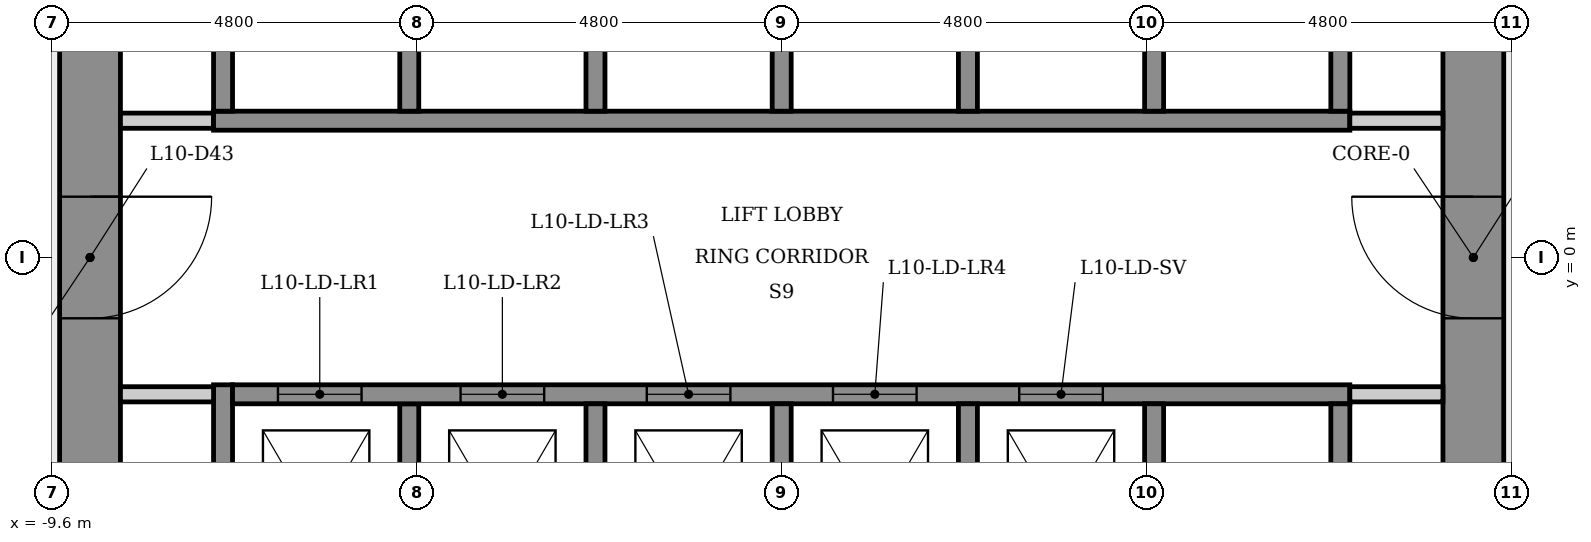
"""IFC4 building model, lengths in metres.
Left out: names, types, materials, properties, quantities, classifications, styles, units other than length and angle.
Written with IfcOpenShell. Run it as: python <this file> out.ifc"""

import sys

from ifc_helpers import new_model, si_unit, direction, frame, frame_2d, origin, place, context, subcontext, project, spatial, rectangle, extrude, element, fill, save


model = new_model("IFC4")
c1 = context("Model", 3, precision=1e-05, world=origin(), true_north=direction((0.0, 1.0)))
c2 = subcontext(c1, "Body", "Model", "MODEL_VIEW")
j1 = project(units=[si_unit("LENGTHUNIT", "METRE"), si_unit("PLANEANGLEUNIT", "RADIAN")], contexts=[c1])
p1 = place(None, origin())
s1 = spatial("IfcSite", under=j1, at=p1, CompositionType="ELEMENT")
p2 = place(p1, origin())
s2 = spatial("IfcBuilding", under=s1, at=p2, CompositionType="ELEMENT")
p3 = place(p2, frame((0.0, 0.0, 42.5)))
s3 = spatial("IfcBuildingStorey", under=s2, at=p3, CompositionType="ELEMENT", Elevation=42.5)
p4 = place(p3, frame((9.1, -5.485, 0.0), z_axis=(0.0, 0.0, 1.0), x_axis=(0.0, 1.0, 0.0)))
e1 = element("IfcWall", 1, at=p4, inside=s3, PredefinedType="SHEAR", context=c2, shape_type="SweptSolid", body=[
    extrude(rectangle(XDim=10.97, YDim=0.8, at=frame_2d((5.485, 0.0))), origin(), (0.0, 0.0, 1.0), 3.4),
])
p5 = place(p4, frame((4.685, 0.0, 0.0)))
e2 = element("IfcOpeningElement", 2, at=p5, cuts=e1, PredefinedType="OPENING", context=c2, shape_type="SweptSolid", body=[
    extrude(rectangle(XDim=1.6, YDim=2.1, at=frame_2d((0.8, 1.05))), frame((0.0, 0.41, 0.0), z_axis=(0.0, -1.0, 0.0), x_axis=(1.0, 0.0, 0.0)), (0.0, 0.0, 1.0), 0.82),
])
p6 = place(p3, frame((-9.1, 5.485, 0.0), z_axis=(0.0, 0.0, 1.0), x_axis=(0.0, -1.0, 0.0)))
e3 = element("IfcWall", 3, at=p6, inside=s3, PredefinedType="SHEAR", context=c2, shape_type="SweptSolid", body=[
    extrude(rectangle(XDim=10.97, YDim=0.8, at=frame_2d((5.485, 0.0))), origin(), (0.0, 0.0, 1.0), 3.4),
])
p7 = place(p6, frame((4.685, 0.0, 0.0)))
e4 = element("IfcOpeningElement", 4, at=p7, cuts=e3, PredefinedType="OPENING", context=c2, shape_type="SweptSolid", body=[
    extrude(rectangle(XDim=1.6, YDim=2.1, at=frame_2d((0.8, 1.05))), frame((0.0, 0.41, 0.0), z_axis=(0.0, -1.0, 0.0), x_axis=(1.0, 0.0, 0.0)), (0.0, 0.0, 1.0), 0.82),
])
p8 = place(p3, frame((-8.7, 1.8, 0.0), z_axis=(0.0, 0.0, 1.0), x_axis=(1.0, 0.0, 0.0)))
e5 = element("IfcWall", 5, at=p8, inside=s3, PredefinedType="PARTITIONING", context=c2, shape_type="SweptSolid", body=[
    extrude(rectangle(XDim=1.225, YDim=0.2, at=frame_2d((0.613, 0.0))), origin(), (0.0, 0.0, 1.0), 3.05),
])
p9 = place(p3, frame((-7.475, 1.8, 0.0), z_axis=(0.0, 0.0, 1.0), x_axis=(1.0, 0.0, 0.0)))
e6 = element("IfcWall", 6, at=p9, inside=s3, PredefinedType="SHEAR", context=c2, shape_type="SweptSolid", body=[
    extrude(rectangle(XDim=14.95, YDim=0.25, at=frame_2d((7.475, 0.0))), origin(), (0.0, 0.0, 1.0), 3.05),
])
p10 = place(p3, frame((-7.35, -5.73, 0.0), z_axis=(0.0, 0.0, 1.0), x_axis=(0.0, 1.0, 0.0)))
e7 = element("IfcWall", 7, at=p10, inside=s3, PredefinedType="SHEAR", context=c2, shape_type="SweptSolid", body=[
    extrude(rectangle(XDim=4.055, YDim=0.25, at=frame_2d((2.028, 0.0))), origin(), (0.0, 0.0, 1.0), 3.05),
])
p11 = place(p3, frame((-7.35, 1.925, 0.0), z_axis=(0.0, 0.0, 1.0), x_axis=(0.0, 1.0, 0.0)))
e8 = element("IfcWall", 8, at=p11, inside=s3, PredefinedType="SHEAR", context=c2, shape_type="SweptSolid", body=[
    extrude(rectangle(XDim=3.805, YDim=0.25, at=frame_2d((1.903, 0.0))), origin(), (0.0, 0.0, 1.0), 3.05),
])
p12 = place(p3, frame((-7.475, -1.8, 0.0), z_axis=(0.0, 0.0, 1.0), x_axis=(-1.0, 0.0, 0.0)))
e9 = element("IfcWall", 9, at=p12, inside=s3, PredefinedType="PARTITIONING", context=c2, shape_type="SweptSolid", body=[
    extrude(rectangle(XDim=1.225, YDim=0.2, at=frame_2d((0.613, 0.0))), origin(), (0.0, 0.0, 1.0), 3.05),
])
for number, where, z_axis, x_axis in (
    (10, (-4.9, -1.925, 0.0), (0.0, 0.0, 1.0), (0.0, -1.0, 0.0)),
    (11, (-4.9, 5.025, 0.0), (0.0, 0.0, 1.0), (0.0, -1.0, 0.0)),
):
    element("IfcWall", number, at=place(p3, frame(where, z_axis=z_axis, x_axis=x_axis)), inside=s3, PredefinedType="SHEAR", context=c2, shape_type="SweptSolid", body=[
        extrude(rectangle(XDim=3.1, YDim=0.25, at=frame_2d((1.55, 0.0))), origin(), (0.0, 0.0, 1.0), 3.4),
    ])
p13 = place(p3, frame((-7.225, -1.8, 0.0), z_axis=(0.0, 0.0, 1.0), x_axis=(1.0, 0.0, 0.0)))
e12 = element("IfcWall", 12, at=p13, inside=s3, PredefinedType="SHEAR", context=c2, shape_type="SweptSolid", body=[
    extrude(rectangle(XDim=14.7, YDim=0.25, at=frame_2d((7.35, 0.0))), origin(), (0.0, 0.0, 1.0), 3.05),
])
p14 = place(p13, frame((0.597, 0.0, 0.0)))
e13 = element("IfcOpeningElement", 13, at=p14, cuts=e12, PredefinedType="OPENING", context=c2, shape_type="SweptSolid", body=[
    extrude(rectangle(XDim=1.1, YDim=2.1, at=frame_2d((0.55, 1.05))), frame((0.0, 0.135, 0.0), z_axis=(0.0, -1.0, 0.0), x_axis=(1.0, 0.0, 0.0)), (0.0, 0.0, 1.0), 0.27),
])
p15 = place(p13, frame((3.0, 0.0, 0.0)))
e14 = element("IfcOpeningElement", 14, at=p15, cuts=e12, PredefinedType="OPENING", context=c2, shape_type="SweptSolid", body=[
    extrude(rectangle(XDim=1.1, YDim=2.1, at=frame_2d((0.55, 1.05))), frame((0.0, 0.135, 0.0), z_axis=(0.0, -1.0, 0.0), x_axis=(1.0, 0.0, 0.0)), (0.0, 0.0, 1.0), 0.27),
])
p16 = place(p13, frame((5.45, 0.0, 0.0)))
e15 = element("IfcOpeningElement", 15, at=p16, cuts=e12, PredefinedType="OPENING", context=c2, shape_type="SweptSolid", body=[
    extrude(rectangle(XDim=1.1, YDim=2.1, at=frame_2d((0.55, 1.05))), frame((0.0, 0.135, 0.0), z_axis=(0.0, -1.0, 0.0), x_axis=(1.0, 0.0, 0.0)), (0.0, 0.0, 1.0), 0.27),
])
p17 = place(p13, frame((7.9, 0.0, 0.0)))
e16 = element("IfcOpeningElement", 16, at=p17, cuts=e12, PredefinedType="OPENING", context=c2, shape_type="SweptSolid", body=[
    extrude(rectangle(XDim=1.1, YDim=2.1, at=frame_2d((0.55, 1.05))), frame((0.0, 0.135, 0.0), z_axis=(0.0, -1.0, 0.0), x_axis=(1.0, 0.0, 0.0)), (0.0, 0.0, 1.0), 0.27),
])
p18 = place(p13, frame((10.35, 0.0, 0.0)))
e17 = element("IfcOpeningElement", 17, at=p18, cuts=e12, PredefinedType="OPENING", context=c2, shape_type="SweptSolid", body=[
    extrude(rectangle(XDim=1.1, YDim=2.1, at=frame_2d((0.55, 1.05))), frame((0.0, 0.135, 0.0), z_axis=(0.0, -1.0, 0.0), x_axis=(1.0, 0.0, 0.0)), (0.0, 0.0, 1.0), 0.27),
])
for number, where, z_axis, x_axis in (
    (18, (-2.45, -1.925, 0.0), (0.0, 0.0, 1.0), (0.0, -1.0, 0.0)),
    (19, (-2.45, 5.025, 0.0), (0.0, 0.0, 1.0), (0.0, -1.0, 0.0)),
    (20, (0.0, -1.925, 0.0), (0.0, 0.0, 1.0), (0.0, -1.0, 0.0)),
    (21, (0.0, 5.025, 0.0), (0.0, 0.0, 1.0), (0.0, -1.0, 0.0)),
    (22, (2.45, -1.925, 0.0), (0.0, 0.0, 1.0), (0.0, -1.0, 0.0)),
    (23, (2.45, 5.025, 0.0), (0.0, 0.0, 1.0), (0.0, -1.0, 0.0)),
    (24, (4.9, -1.925, 0.0), (0.0, 0.0, 1.0), (0.0, -1.0, 0.0)),
    (25, (4.9, 5.025, 0.0), (0.0, 0.0, 1.0), (0.0, -1.0, 0.0)),
):
    element("IfcWall", number, at=place(p3, frame(where, z_axis=z_axis, x_axis=x_axis)), inside=s3, PredefinedType="SHEAR", context=c2, shape_type="SweptSolid", body=[
        extrude(rectangle(XDim=3.1, YDim=0.25, at=frame_2d((1.55, 0.0))), origin(), (0.0, 0.0, 1.0), 3.4),
    ])
p19 = place(p3, frame((7.475, 1.8, 0.0), z_axis=(0.0, 0.0, 1.0), x_axis=(1.0, 0.0, 0.0)))
e26 = element("IfcWall", 26, at=p19, inside=s3, PredefinedType="PARTITIONING", context=c2, shape_type="SweptSolid", body=[
    extrude(rectangle(XDim=1.225, YDim=0.2, at=frame_2d((0.613, 0.0))), origin(), (0.0, 0.0, 1.0), 3.05),
])
for number, where, z_axis, x_axis in (
    (27, (7.35, -1.925, 0.0), (0.0, 0.0, 1.0), (0.0, -1.0, 0.0)),
    (28, (7.35, 5.73, 0.0), (0.0, 0.0, 1.0), (0.0, -1.0, 0.0)),
):
    element("IfcWall", number, at=place(p3, frame(where, z_axis=z_axis, x_axis=x_axis)), inside=s3, PredefinedType="SHEAR", context=c2, shape_type="SweptSolid", body=[
        extrude(rectangle(XDim=3.805, YDim=0.25, at=frame_2d((1.903, 0.0))), origin(), (0.0, 0.0, 1.0), 3.05),
    ])
p20 = place(p3, frame((8.7, -1.8, 0.0), z_axis=(0.0, 0.0, 1.0), x_axis=(-1.0, 0.0, 0.0)))
e29 = element("IfcWall", 29, at=p20, inside=s3, PredefinedType="PARTITIONING", context=c2, shape_type="SweptSolid", body=[
    extrude(rectangle(XDim=1.225, YDim=0.2, at=frame_2d((0.613, 0.0))), origin(), (0.0, 0.0, 1.0), 3.05),
])
p21 = place(p14, origin())
e30 = element("IfcDoor", 30, at=p21, inside=s3, OperationType="SLIDING_TO_LEFT", PredefinedType="DOOR", context=c2, shape_type="SweptSolid", body=[
    extrude(rectangle(XDim=1.1, YDim=2.1, at=frame_2d((0.55, 1.05))), frame((0.0, 0.025, 0.0), z_axis=(0.0, -1.0, 0.0), x_axis=(1.0, 0.0, 0.0)), (0.0, 0.0, 1.0), 0.05),
])
fill(e13, e30)
p22 = place(p15, origin())
e31 = element("IfcDoor", 31, at=p22, inside=s3, OperationType="SLIDING_TO_LEFT", PredefinedType="DOOR", context=c2, shape_type="SweptSolid", body=[
    extrude(rectangle(XDim=1.1, YDim=2.1, at=frame_2d((0.55, 1.05))), frame((0.0, 0.025, 0.0), z_axis=(0.0, -1.0, 0.0), x_axis=(1.0, 0.0, 0.0)), (0.0, 0.0, 1.0), 0.05),
])
fill(e14, e31)
p23 = place(p16, origin())
e32 = element("IfcDoor", 32, at=p23, inside=s3, OperationType="SLIDING_TO_LEFT", PredefinedType="DOOR", context=c2, shape_type="SweptSolid", body=[
    extrude(rectangle(XDim=1.1, YDim=2.1, at=frame_2d((0.55, 1.05))), frame((0.0, 0.025, 0.0), z_axis=(0.0, -1.0, 0.0), x_axis=(1.0, 0.0, 0.0)), (0.0, 0.0, 1.0), 0.05),
])
fill(e15, e32)
p24 = place(p17, origin())
e33 = element("IfcDoor", 33, at=p24, inside=s3, OperationType="SLIDING_TO_LEFT", PredefinedType="DOOR", context=c2, shape_type="SweptSolid", body=[
    extrude(rectangle(XDim=1.1, YDim=2.1, at=frame_2d((0.55, 1.05))), frame((0.0, 0.025, 0.0), z_axis=(0.0, -1.0, 0.0), x_axis=(1.0, 0.0, 0.0)), (0.0, 0.0, 1.0), 0.05),
])
fill(e16, e33)
p25 = place(p18, origin())
e34 = element("IfcDoor", 34, at=p25, inside=s3, OperationType="SLIDING_TO_LEFT", PredefinedType="DOOR", context=c2, shape_type="SweptSolid", body=[
    extrude(rectangle(XDim=1.1, YDim=2.1, at=frame_2d((0.55, 1.05))), frame((0.0, 0.025, 0.0), z_axis=(0.0, -1.0, 0.0), x_axis=(1.0, 0.0, 0.0)), (0.0, 0.0, 1.0), 0.05),
])
fill(e17, e34)
p26 = place(p5, origin())
e35 = element("IfcDoor", 35, at=p26, inside=s3, OperationType="SINGLE_SWING_RIGHT", PredefinedType="DOOR", context=c2, shape_type="SweptSolid", body=[
    extrude(rectangle(XDim=1.6, YDim=2.1, at=frame_2d((0.8, 1.05))), frame((0.0, 0.025, 0.0), z_axis=(0.0, -1.0, 0.0), x_axis=(1.0, 0.0, 0.0)), (0.0, 0.0, 1.0), 0.05),
])
fill(e2, e35)
p27 = place(p7, origin())
e36 = element("IfcDoor", 36, at=p27, inside=s3, OperationType="SINGLE_SWING_LEFT", PredefinedType="DOOR", context=c2, shape_type="SweptSolid", body=[
    extrude(rectangle(XDim=1.6, YDim=2.1, at=frame_2d((0.8, 1.05))), frame((0.0, 0.025, 0.0), z_axis=(0.0, -1.0, 0.0), x_axis=(1.0, 0.0, 0.0)), (0.0, 0.0, 1.0), 0.05),
])
fill(e4, e36)
save(model, sys.argv[1])
